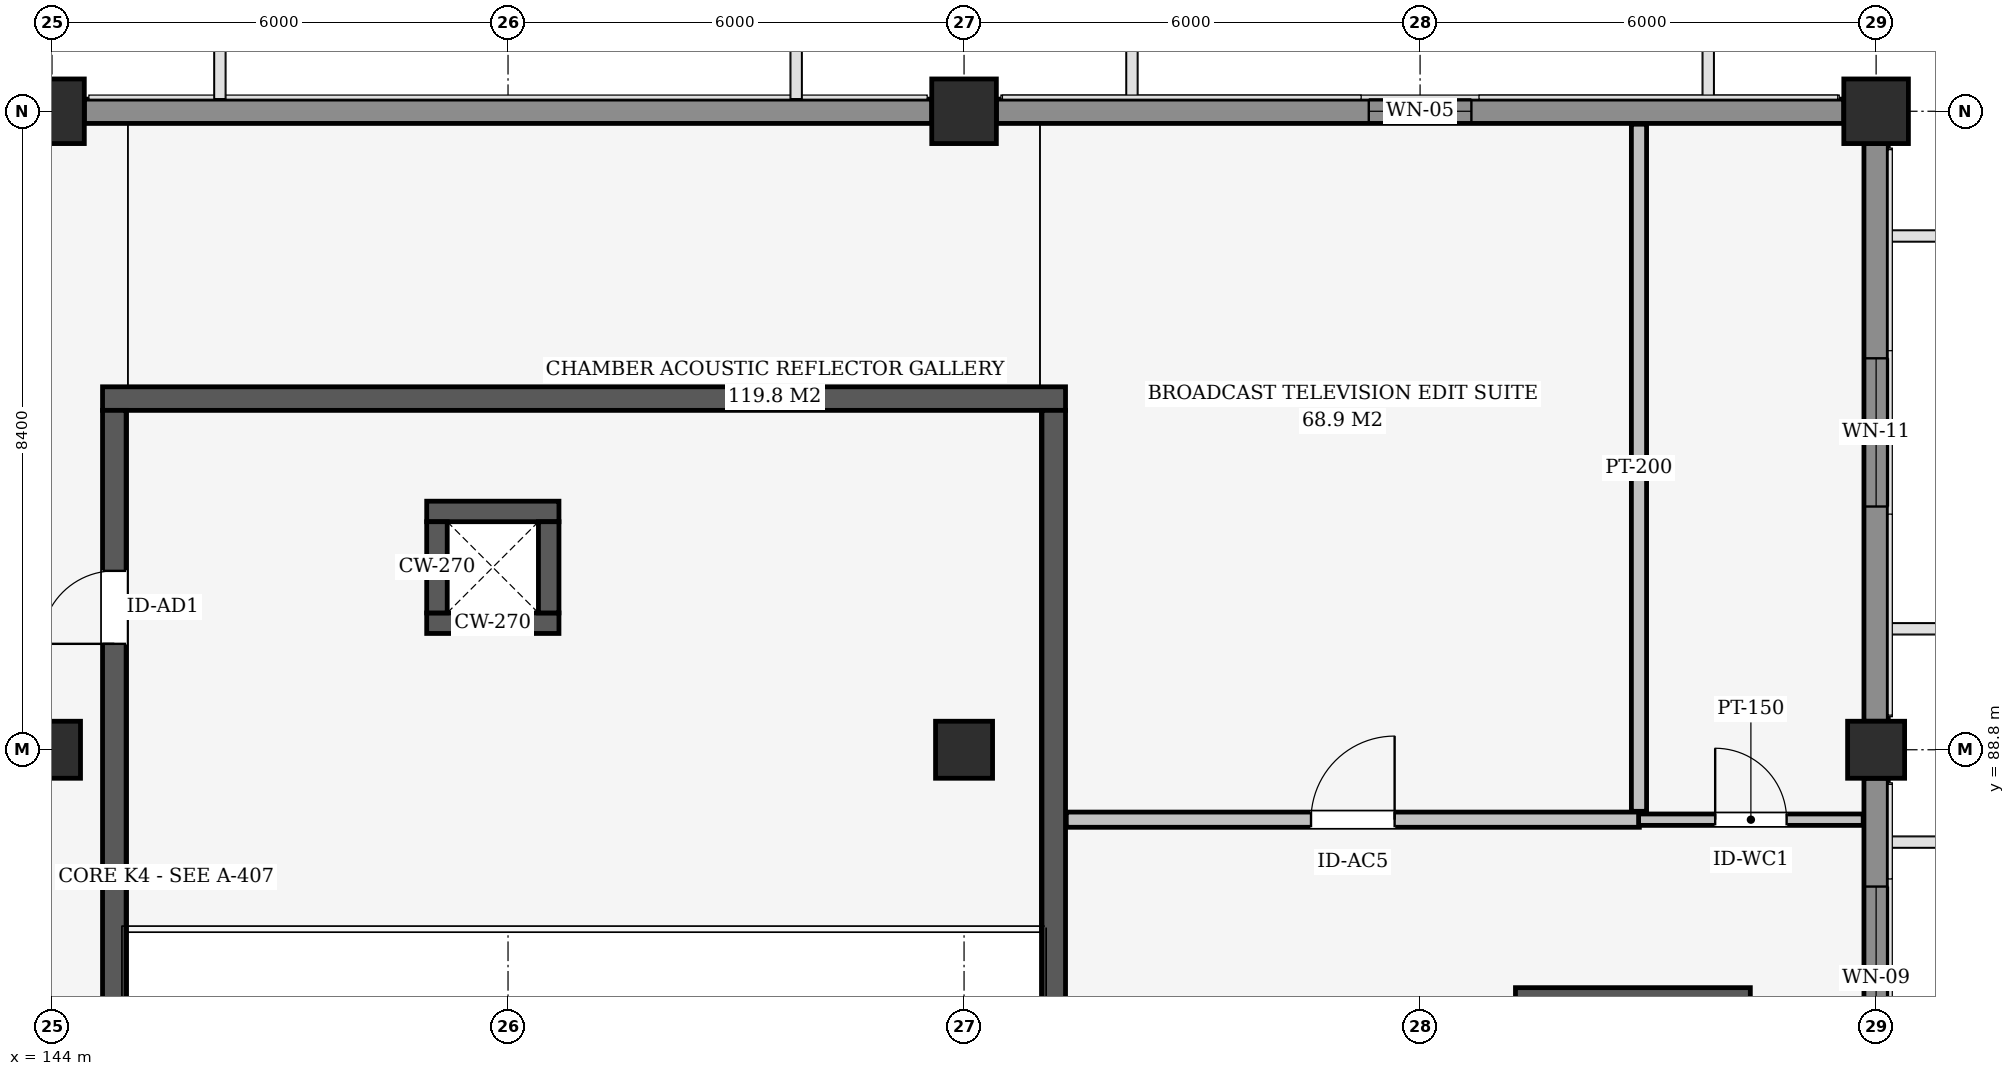
"""IFC4 building model, lengths in metres.
Left out: names, types, materials, properties, quantities, classifications, styles, units other than length and angle.
Written with IfcOpenShell. Run it as: python <this file> out.ifc"""

import sys

from ifc_helpers import new_model, si_unit, direction, frame, frame_2d, origin, origin_2d, place, context, subcontext, project, spatial, rectangle, extrude, element, fill, save


model = new_model("IFC4")
c1 = context("Model", 3, precision=1e-05, world=origin(), true_north=direction((0.0, 1.0)))
c2 = subcontext(c1, "Body", "Model", "MODEL_VIEW")
j1 = project(units=[si_unit("LENGTHUNIT", "METRE"), si_unit("PLANEANGLEUNIT", "RADIAN")], contexts=[c1])
p1 = place(None, origin())
s1 = spatial("IfcSite", under=j1, at=p1, CompositionType="ELEMENT")
p2 = place(p1, origin())
s2 = spatial("IfcBuilding", under=s1, at=p2, CompositionType="ELEMENT")
p3 = place(p2, frame((0.0, 0.0, 9.3)))
s3 = spatial("IfcBuildingStorey", under=s2, at=p3, CompositionType="ELEMENT", Elevation=9.3)
p4 = place(p3, frame((144.0, 88.8, 0.0), z_axis=(0.0, 0.0, 1.0), x_axis=(1.0, 0.0, 0.0)))
e1 = element("IfcColumn", 1, at=p4, inside=s3, PredefinedType="COLUMN", context=c2, shape_type="SweptSolid", body=[
    extrude(rectangle(XDim=0.75, YDim=0.75, at=origin_2d()), origin(), (0.0, 0.0, 1.0), 4.5),
])
p5 = place(p3, frame((144.0, 97.2, 0.0), z_axis=(0.0, 0.0, 1.0), x_axis=(1.0, 0.0, 0.0)))
e2 = element("IfcColumn", 2, at=p5, inside=s3, PredefinedType="COLUMN", context=c2, shape_type="SweptSolid", body=[
    extrude(rectangle(XDim=0.85, YDim=0.85, at=origin_2d()), origin(), (0.0, 0.0, 1.0), 4.5),
])
p6 = place(p3, frame((156.0, 88.8, 0.0), z_axis=(0.0, 0.0, 1.0), x_axis=(1.0, 0.0, 0.0)))
e3 = element("IfcColumn", 3, at=p6, inside=s3, PredefinedType="COLUMN", context=c2, shape_type="SweptSolid", body=[
    extrude(rectangle(XDim=0.75, YDim=0.75, at=origin_2d()), origin(), (0.0, 0.0, 1.0), 4.5),
])
p7 = place(p3, frame((156.0, 97.2, 0.0), z_axis=(0.0, 0.0, 1.0), x_axis=(1.0, 0.0, 0.0)))
e4 = element("IfcColumn", 4, at=p7, inside=s3, PredefinedType="COLUMN", context=c2, shape_type="SweptSolid", body=[
    extrude(rectangle(XDim=0.85, YDim=0.85, at=origin_2d()), origin(), (0.0, 0.0, 1.0), 4.5),
])
p8 = place(p3, frame((168.0, 88.8, 0.0), z_axis=(0.0, 0.0, 1.0), x_axis=(1.0, 0.0, 0.0)))
e5 = element("IfcColumn", 5, at=p8, inside=s3, PredefinedType="COLUMN", context=c2, shape_type="SweptSolid", body=[
    extrude(rectangle(XDim=0.75, YDim=0.75, at=origin_2d()), origin(), (0.0, 0.0, 1.0), 4.5),
])
p9 = place(p3, frame((168.0, 97.2, 0.0), z_axis=(0.0, 0.0, 1.0), x_axis=(1.0, 0.0, 0.0)))
e6 = element("IfcColumn", 6, at=p9, inside=s3, PredefinedType="COLUMN", context=c2, shape_type="SweptSolid", body=[
    extrude(rectangle(XDim=0.85, YDim=0.85, at=origin_2d()), origin(), (0.0, 0.0, 1.0), 4.5),
])
p10 = place(p3, frame((144.665, 93.42, 0.0), z_axis=(0.0, 0.0, 1.0), x_axis=(1.0, 0.0, 0.0)))
e7 = element("IfcWall", 7, at=p10, inside=s3, PredefinedType="SHEAR", context=c2, shape_type="SweptSolid", body=[
    extrude(rectangle(XDim=12.67, YDim=0.31, at=frame_2d((6.335, 0.0))), origin(), (0.0, 0.0, 1.0), 4.22),
])
p11 = place(p3, frame((144.82, 77.375, 0.0), z_axis=(0.0, 0.0, 1.0), x_axis=(0.0, 1.0, 0.0)))
e8 = element("IfcWall", 8, at=p11, inside=s3, PredefinedType="SHEAR", context=c2, shape_type="SweptSolid", body=[
    extrude(rectangle(XDim=15.89, YDim=0.31, at=frame_2d((7.945, 0.0))), origin(), (0.0, 0.0, 1.0), 4.22),
])
p12 = place(p11, frame((12.818, 0.0, 0.0)))
e9 = element("IfcOpeningElement", 9, at=p12, cuts=e8, PredefinedType="OPENING", context=c2, shape_type="SweptSolid", body=[
    extrude(rectangle(XDim=0.96, YDim=2.16, at=frame_2d((0.48, 1.08))), frame((0.0, 0.165, 0.0), z_axis=(0.0, -1.0, 0.0), x_axis=(1.0, 0.0, 0.0)), (0.0, 0.0, 1.0), 0.33),
])
p13 = place(p3, frame((157.18, 77.375, 0.0), z_axis=(0.0, 0.0, 1.0), x_axis=(0.0, 1.0, 0.0)))
e10 = element("IfcWall", 10, at=p13, inside=s3, PredefinedType="SHEAR", context=c2, shape_type="SweptSolid", body=[
    extrude(rectangle(XDim=15.89, YDim=0.31, at=frame_2d((7.945, 0.0))), origin(), (0.0, 0.0, 1.0), 4.22),
])
p14 = place(p3, frame((144.425, 97.2, 0.0), z_axis=(0.0, 0.0, 1.0), x_axis=(1.0, 0.0, 0.0)))
e11 = element("IfcWall", 11, at=p14, inside=s3, PredefinedType="SOLIDWALL", context=c2, shape_type="SweptSolid", body=[
    extrude(rectangle(XDim=11.15, YDim=0.32, at=frame_2d((5.575, 0.0))), origin(), (0.0, 0.0, 1.0), 3.664),
])
p15 = place(p3, frame((156.425, 97.2, 0.0), z_axis=(0.0, 0.0, 1.0), x_axis=(1.0, 0.0, 0.0)))
e12 = element("IfcWall", 12, at=p15, inside=s3, PredefinedType="SOLIDWALL", context=c2, shape_type="SweptSolid", body=[
    extrude(rectangle(XDim=11.15, YDim=0.32, at=frame_2d((5.575, 0.0))), origin(), (0.0, 0.0, 1.0), 3.664),
])
p16 = place(p15, frame((4.9, 0.0, 0.85)))
e13 = element("IfcOpeningElement", 13, at=p16, cuts=e12, PredefinedType="OPENING", context=c2, shape_type="SweptSolid", body=[
    extrude(rectangle(XDim=1.35, YDim=1.5, at=frame_2d((0.675, 0.75))), frame((0.0, 0.17, 0.0), z_axis=(0.0, -1.0, 0.0), x_axis=(1.0, 0.0, 0.0)), (0.0, 0.0, 1.0), 0.34),
])
p17 = place(p3, frame((168.0, 88.425, 0.0), z_axis=(0.0, 0.0, 1.0), x_axis=(0.0, -1.0, 0.0)))
e14 = element("IfcWall", 14, at=p17, inside=s3, PredefinedType="SOLIDWALL", context=c2, shape_type="SweptSolid", body=[
    extrude(rectangle(XDim=5.25, YDim=0.32, at=frame_2d((2.625, 0.0))), origin(), (0.0, 0.0, 1.0), 3.588),
])
p18 = place(p17, frame((1.425, 0.0, 0.85)))
e15 = element("IfcOpeningElement", 15, at=p18, cuts=e14, PredefinedType="OPENING", context=c2, shape_type="SweptSolid", body=[
    extrude(rectangle(XDim=2.4, YDim=0.95, at=frame_2d((1.2, 0.475))), frame((0.0, 0.17, 0.0), z_axis=(0.0, -1.0, 0.0), x_axis=(1.0, 0.0, 0.0)), (0.0, 0.0, 1.0), 0.34),
])
p19 = place(p3, frame((168.0, 96.775, 0.0), z_axis=(0.0, 0.0, 1.0), x_axis=(0.0, -1.0, 0.0)))
e16 = element("IfcWall", 16, at=p19, inside=s3, PredefinedType="SOLIDWALL", context=c2, shape_type="SweptSolid", body=[
    extrude(rectangle(XDim=7.6, YDim=0.32, at=frame_2d((3.8, 0.0))), origin(), (0.0, 0.0, 1.0), 3.588),
])
p20 = place(p19, frame((2.825, 0.0, 0.85)))
e17 = element("IfcOpeningElement", 17, at=p20, cuts=e16, PredefinedType="OPENING", context=c2, shape_type="SweptSolid", body=[
    extrude(rectangle(XDim=1.95, YDim=1.75, at=frame_2d((0.975, 0.875))), frame((0.0, 0.17, 0.0), z_axis=(0.0, -1.0, 0.0), x_axis=(1.0, 0.0, 0.0)), (0.0, 0.0, 1.0), 0.34),
])
for number, where, z_axis, x_axis in (
    (18, (148.93, 90.465, 0.0), (0.0, 0.0, 1.0), (1.0, 0.0, 0.0)),
    (19, (148.93, 91.935, 0.0), (0.0, 0.0, 1.0), (1.0, 0.0, 0.0)),
):
    element("IfcWall", number, at=place(p3, frame(where, z_axis=z_axis, x_axis=x_axis)), inside=s3, PredefinedType="SHEAR", context=c2, shape_type="SweptSolid", body=[
        extrude(rectangle(XDim=1.74, YDim=0.27, at=frame_2d((0.87, 0.0))), origin(), (0.0, 0.0, 1.0), 4.22),
    ])
for number, where, z_axis, x_axis in (
    (20, (149.065, 90.6, 0.0), (0.0, 0.0, 1.0), (0.0, 1.0, 0.0)),
    (21, (150.535, 90.6, 0.0), (0.0, 0.0, 1.0), (0.0, 1.0, 0.0)),
):
    element("IfcWall", number, at=place(p3, frame(where, z_axis=z_axis, x_axis=x_axis)), inside=s3, PredefinedType="SHEAR", context=c2, shape_type="SweptSolid", body=[
        extrude(rectangle(XDim=1.2, YDim=0.27, at=frame_2d((0.6, 0.0))), origin(), (0.0, 0.0, 1.0), 4.22),
    ])
p21 = place(p3, frame((163.255, 85.535, 0.0), z_axis=(0.0, 0.0, 1.0), x_axis=(1.0, 0.0, 0.0)))
e22 = element("IfcWall", 22, at=p21, inside=s3, PredefinedType="SHEAR", context=c2, shape_type="SweptSolid", body=[
    extrude(rectangle(XDim=3.09, YDim=0.27, at=frame_2d((1.545, 0.0))), origin(), (0.0, 0.0, 1.0), 4.22),
])
p22 = place(p3, frame((157.345, 87.88, 0.0), z_axis=(0.0, 0.0, 1.0), x_axis=(1.0, 0.0, 0.0)))
e23 = element("IfcWall", 23, at=p22, inside=s3, PredefinedType="PARTITIONING", context=c2, shape_type="SweptSolid", body=[
    extrude(rectangle(XDim=7.54, YDim=0.2, at=frame_2d((3.77, 0.0))), origin(), (0.0, 0.0, 1.0), 4.2),
])
p23 = place(p22, frame((3.22, 0.0, 0.0)))
e24 = element("IfcOpeningElement", 24, at=p23, cuts=e23, PredefinedType="OPENING", context=c2, shape_type="SweptSolid", body=[
    extrude(rectangle(XDim=1.1, YDim=2.26, at=frame_2d((0.55, 1.13))), frame((0.0, 0.11, 0.0), z_axis=(0.0, -1.0, 0.0), x_axis=(1.0, 0.0, 0.0)), (0.0, 0.0, 1.0), 0.22),
])
p24 = place(p3, frame((164.875, 87.88, 0.0), z_axis=(0.0, 0.0, 1.0), x_axis=(1.0, 0.0, 0.0)))
e25 = element("IfcWall", 25, at=p24, inside=s3, PredefinedType="PARTITIONING", context=c2, shape_type="SweptSolid", body=[
    extrude(rectangle(XDim=2.955, YDim=0.15, at=frame_2d((1.478, 0.0))), origin(), (0.0, 0.0, 1.0), 4.2),
])
p25 = place(p24, frame((1.008, 0.0, 0.0)))
e26 = element("IfcOpeningElement", 26, at=p25, cuts=e25, PredefinedType="OPENING", context=c2, shape_type="SweptSolid", body=[
    extrude(rectangle(XDim=0.94, YDim=2.1, at=frame_2d((0.47, 1.05))), frame((0.0, 0.085, 0.0), z_axis=(0.0, -1.0, 0.0), x_axis=(1.0, 0.0, 0.0)), (0.0, 0.0, 1.0), 0.17),
])
p26 = place(p3, frame((164.88, 87.99, 0.0), z_axis=(0.0, 0.0, 1.0), x_axis=(0.0, 1.0, 0.0)))
e27 = element("IfcWall", 27, at=p26, inside=s3, PredefinedType="PARTITIONING", context=c2, shape_type="SweptSolid", body=[
    extrude(rectangle(XDim=9.04, YDim=0.2, at=frame_2d((4.52, 0.0))), origin(), (0.0, 0.0, 1.0), 3.743),
])
p27 = place(p16, origin())
e28 = element("IfcWindow", 28, at=p27, inside=s3, PartitioningType="SINGLE_PANEL", PredefinedType="WINDOW", context=c2, shape_type="SweptSolid", body=[
    extrude(rectangle(XDim=1.35, YDim=1.5, at=frame_2d((0.675, 0.75))), frame((0.0, 0.03, 0.0), z_axis=(0.0, -1.0, 0.0), x_axis=(1.0, 0.0, 0.0)), (0.0, 0.0, 1.0), 0.06),
])
fill(e13, e28)
p28 = place(p18, origin())
e29 = element("IfcWindow", 29, at=p28, inside=s3, PartitioningType="SINGLE_PANEL", PredefinedType="WINDOW", context=c2, shape_type="SweptSolid", body=[
    extrude(rectangle(XDim=2.4, YDim=0.95, at=frame_2d((1.2, 0.475))), frame((0.0, 0.03, 0.0), z_axis=(0.0, -1.0, 0.0), x_axis=(1.0, 0.0, 0.0)), (0.0, 0.0, 1.0), 0.06),
])
fill(e15, e29)
p29 = place(p20, origin())
e30 = element("IfcWindow", 30, at=p29, inside=s3, PartitioningType="SINGLE_PANEL", PredefinedType="WINDOW", context=c2, shape_type="SweptSolid", body=[
    extrude(rectangle(XDim=1.95, YDim=1.75, at=frame_2d((0.975, 0.875))), frame((0.0, 0.03, 0.0), z_axis=(0.0, -1.0, 0.0), x_axis=(1.0, 0.0, 0.0)), (0.0, 0.0, 1.0), 0.06),
])
fill(e17, e30)
p30 = place(p12, origin())
e31 = element("IfcDoor", 31, at=p30, inside=s3, OperationType="SINGLE_SWING_LEFT", PredefinedType="DOOR", context=c2, shape_type="SweptSolid", body=[
    extrude(rectangle(XDim=0.96, YDim=2.16, at=frame_2d((0.48, 1.08))), frame((0.0, 0.025, 0.0), z_axis=(0.0, -1.0, 0.0), x_axis=(1.0, 0.0, 0.0)), (0.0, 0.0, 1.0), 0.05),
])
fill(e9, e31)
p31 = place(p23, origin())
e32 = element("IfcDoor", 32, at=p31, inside=s3, OperationType="SINGLE_SWING_RIGHT", PredefinedType="DOOR", context=c2, shape_type="SweptSolid", body=[
    extrude(rectangle(XDim=1.1, YDim=2.26, at=frame_2d((0.55, 1.13))), frame((0.0, 0.025, 0.0), z_axis=(0.0, -1.0, 0.0), x_axis=(1.0, 0.0, 0.0)), (0.0, 0.0, 1.0), 0.05),
])
fill(e24, e32)
p32 = place(p25, origin())
e33 = element("IfcDoor", 33, at=p32, inside=s3, OperationType="SINGLE_SWING_LEFT", PredefinedType="DOOR", context=c2, shape_type="SweptSolid", body=[
    extrude(rectangle(XDim=0.94, YDim=2.1, at=frame_2d((0.47, 1.05))), frame((0.0, 0.025, 0.0), z_axis=(0.0, -1.0, 0.0), x_axis=(1.0, 0.0, 0.0)), (0.0, 0.0, 1.0), 0.05),
])
fill(e26, e33)
save(model, sys.argv[1])
